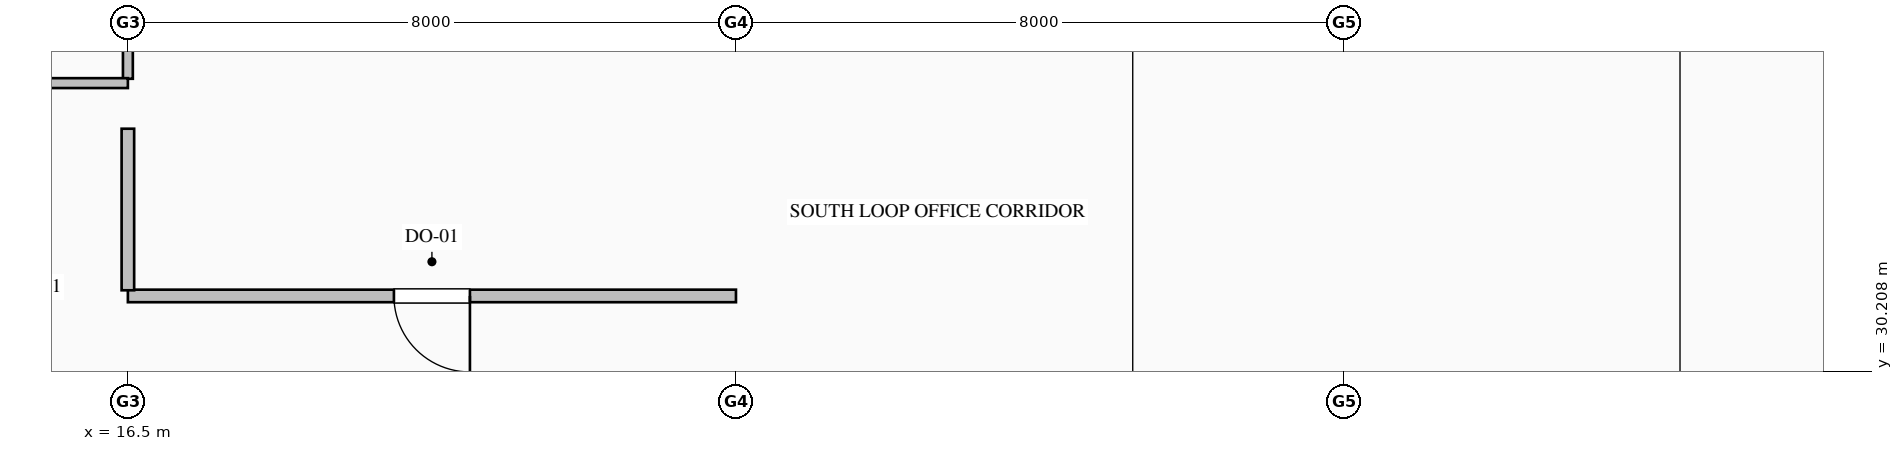
"""IFC4 building model, lengths in metres.
Left out: names, types, materials, properties, quantities, classifications, styles, units other than length and angle.
Written with IfcOpenShell. Run it as: python <this file> out.ifc"""

import sys

from ifc_helpers import new_model, si_unit, direction, frame, frame_2d, origin, place, context, subcontext, project, spatial, rectangle, extrude, element, fill, save


model = new_model("IFC4")
c1 = context("Model", 3, precision=1e-05, world=origin(), true_north=direction((0.0, 1.0)))
c2 = subcontext(c1, "Body", "Model", "MODEL_VIEW")
j1 = project(units=[si_unit("LENGTHUNIT", "METRE"), si_unit("PLANEANGLEUNIT", "RADIAN")], contexts=[c1])
p1 = place(None, origin())
s1 = spatial("IfcSite", under=j1, at=p1, CompositionType="ELEMENT")
p2 = place(p1, origin())
s2 = spatial("IfcBuilding", under=s1, at=p2, CompositionType="ELEMENT")
p3 = place(p2, frame((0.0, 0.0, 155.0)))
s3 = spatial("IfcBuildingStorey", under=s2, at=p3, CompositionType="ELEMENT", Elevation=155.0)
p4 = place(p3, frame((24.5, 31.2, 0.0), z_axis=(0.0, 0.0, 1.0), x_axis=(-1.0, 0.0, 0.0)))
e1 = element("IfcWall", 1, at=p4, inside=s3, PredefinedType="PARTITIONING", context=c2, shape_type="SweptSolid", body=[
    extrude(rectangle(XDim=8.0, YDim=0.165, at=frame_2d((4.0, 0.0))), origin(), (0.0, 0.0, 1.0), 3.765),
])
p5 = place(p4, frame((3.5, 0.0, 0.0)))
e2 = element("IfcOpeningElement", 2, at=p5, cuts=e1, PredefinedType="OPENING", context=c2, shape_type="SweptSolid", body=[
    extrude(rectangle(XDim=1.0, YDim=2.15, at=frame_2d((0.5, 1.075))), frame((0.0, 0.093, 0.0), z_axis=(0.0, -1.0, 0.0), x_axis=(1.0, 0.0, 0.0)), (0.0, 0.0, 1.0), 0.185),
])
p6 = place(p3, frame((16.5, 31.274, 0.0), z_axis=(0.0, 0.0, 1.0), x_axis=(0.0, 1.0, 0.0)))
e3 = element("IfcWall", 3, at=p6, inside=s3, PredefinedType="PARTITIONING", context=c2, shape_type="SweptSolid", body=[
    extrude(rectangle(XDim=2.125, YDim=0.165, at=frame_2d((1.063, 0.0))), origin(), (0.0, 0.0, 1.0), 3.157),
])
p7 = place(p3, frame((16.5, 34.057, 0.0), z_axis=(0.0, 0.0, 1.0), x_axis=(0.0, 1.0, 0.0)))
e4 = element("IfcWall", 4, at=p7, inside=s3, PredefinedType="PARTITIONING", context=c2, shape_type="SweptSolid", body=[
    extrude(rectangle(XDim=6.286, YDim=0.13, at=frame_2d((3.143, 0.0))), origin(), (0.0, 0.0, 1.0), 3.157),
])
p8 = place(p7, frame((2.643, 0.0, 0.0)))
e5 = element("IfcOpeningElement", 5, at=p8, cuts=e4, PredefinedType="OPENING", context=c2, shape_type="SweptSolid", body=[
    extrude(rectangle(XDim=1.0, YDim=2.15, at=frame_2d((0.5, 1.075))), frame((0.0, 0.075, 0.0), z_axis=(0.0, -1.0, 0.0), x_axis=(1.0, 0.0, 0.0)), (0.0, 0.0, 1.0), 0.15),
])
p9 = place(p3, frame((9.352, 34.0, 0.0), z_axis=(0.0, 0.0, 1.0), x_axis=(1.0, 0.0, 0.0)))
e6 = element("IfcWall", 6, at=p9, inside=s3, PredefinedType="PARTITIONING", context=c2, shape_type="SweptSolid", body=[
    extrude(rectangle(XDim=7.148, YDim=0.13, at=frame_2d((3.574, 0.0))), origin(), (0.0, 0.0, 1.0), 3.765),
])
p10 = place(p5, origin())
e7 = element("IfcDoor", 7, at=p10, inside=s3, OperationType="SINGLE_SWING_LEFT", PredefinedType="DOOR", context=c2, shape_type="SweptSolid", body=[
    extrude(rectangle(XDim=1.0, YDim=2.15, at=frame_2d((0.5, 1.075))), frame((0.0, 0.025, 0.0), z_axis=(0.0, -1.0, 0.0), x_axis=(1.0, 0.0, 0.0)), (0.0, 0.0, 1.0), 0.05),
])
fill(e2, e7)
save(model, sys.argv[1])
